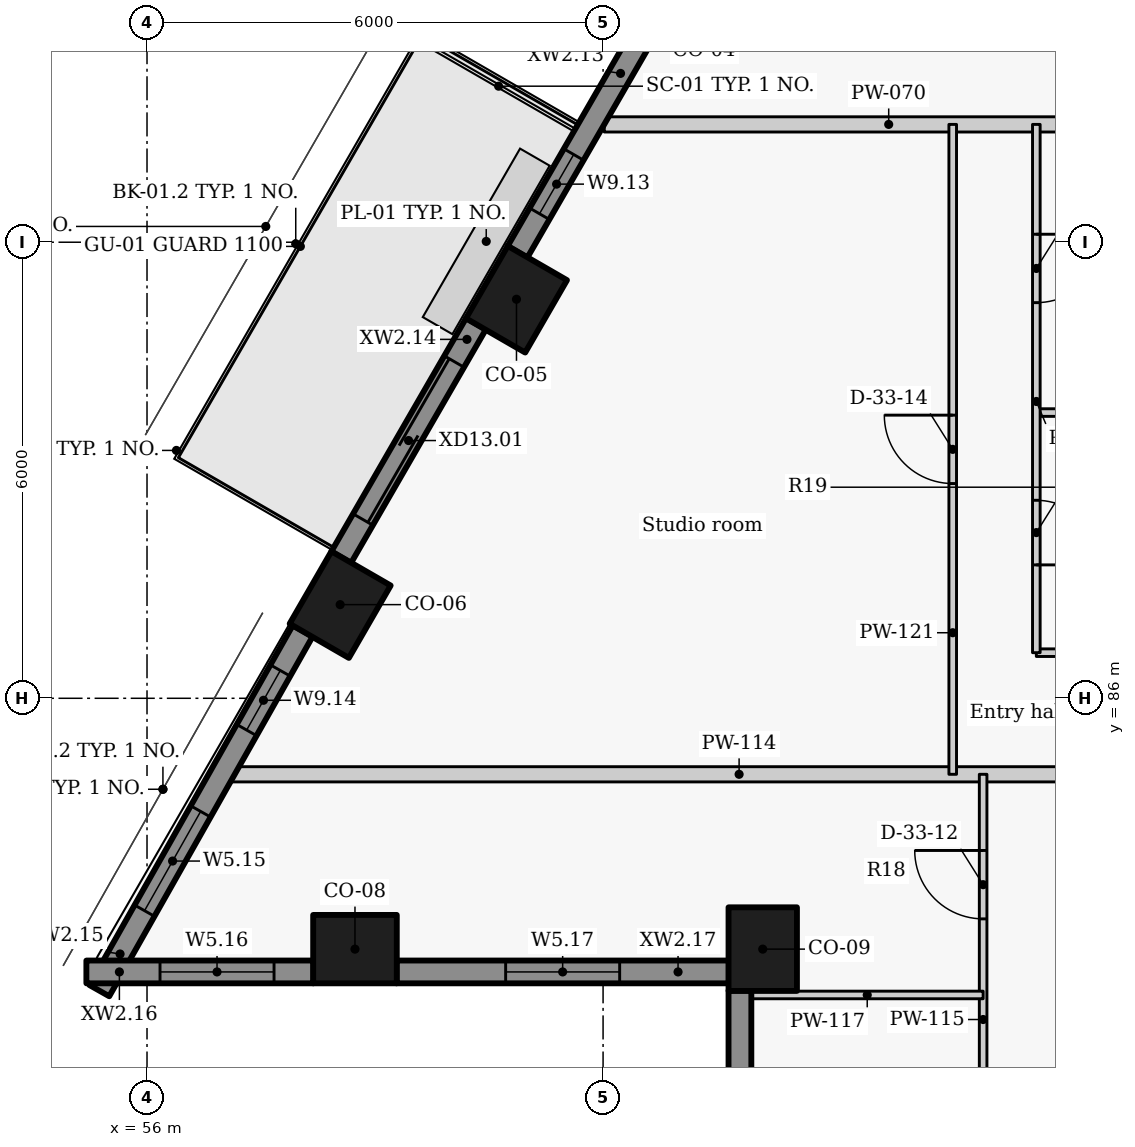
"""IFC4 building model, lengths in metres.
Left out: names, types, materials, properties, quantities, classifications, styles, units other than length and angle.
Written with IfcOpenShell. Run it as: python <this file> out.ifc"""

import sys

from ifc_helpers import new_model, si_unit, direction, frame, frame_2d, origin, origin_2d, place, context, subcontext, project, spatial, rectangle, extrude, element, fill, save


model = new_model("IFC4")
c1 = context("Model", 3, precision=1e-05, world=origin(), true_north=direction((0.0, 1.0)))
c2 = subcontext(c1, "Body", "Model", "MODEL_VIEW")
j1 = project(units=[si_unit("LENGTHUNIT", "METRE"), si_unit("PLANEANGLEUNIT", "RADIAN")], contexts=[c1])
p1 = place(None, origin())
s1 = spatial("IfcSite", under=j1, at=p1, CompositionType="ELEMENT")
p2 = place(p1, origin())
s2 = spatial("IfcBuilding", under=s1, at=p2, CompositionType="ELEMENT")
p3 = place(p2, frame((0.0, 0.0, 269.1)))
s3 = spatial("IfcBuildingStorey", under=s2, at=p3, CompositionType="ELEMENT", Elevation=269.1)
for number, where, z_axis, x_axis in (
    (1, (60.861, 91.25, 0.0), (0.0, 0.0, 1.0), (-0.5, -0.866, 0.0)),
    (2, (58.541, 87.232, 0.0), (0.0, 0.0, 1.0), (-0.5, -0.866, 0.0)),
    (3, (58.736, 82.7, 0.0), (0.0, 0.0, 1.0), (1.0, 0.0, 0.0)),
    (4, (64.101, 82.7, 0.0), (0.0, 0.0, 1.0), (0.0, -1.0, 0.0)),
):
    element("IfcColumn", number, at=place(p3, frame(where, z_axis=z_axis, x_axis=x_axis)), inside=s3, PredefinedType="COLUMN", context=c2, shape_type="SweptSolid", body=[
        extrude(rectangle(XDim=1.1, YDim=0.9, at=origin_2d()), origin(), (0.0, 0.0, 1.0), 3.3),
    ])
p4 = place(p3, frame((62.796, 95.202, 0.0), z_axis=(0.0, 0.0, 1.0), x_axis=(-0.499984490703, -0.866034357896, 0.0)))
e5 = element("IfcWall", 5, at=p4, inside=s3, PredefinedType="SOLIDWALL", context=c2, shape_type="SweptSolid", body=[
    extrude(rectangle(XDim=3.844, YDim=0.3, at=frame_2d((1.922, 0.0))), origin(), (0.0, 0.0, 1.0), 2.125),
])
p5 = place(p4, frame((2.365, 0.0, 0.9)))
e6 = element("IfcOpeningElement", 6, at=p5, cuts=e5, PredefinedType="OPENING", context=c2, shape_type="SweptSolid", body=[
    extrude(rectangle(XDim=0.9, YDim=1.1, at=frame_2d((0.45, 0.55))), frame((0.0, 0.16, 0.0), z_axis=(0.0, -1.0, 0.0), x_axis=(1.0, 0.0, 0.0)), (0.0, 0.0, 1.0), 0.32),
])
p6 = place(p3, frame((60.328, 90.927, 0.0), z_axis=(0.0, 0.0, 1.0), x_axis=(-0.500010404316, -0.866019396766, 0.0)))
e7 = element("IfcWall", 7, at=p6, inside=s3, PredefinedType="SOLIDWALL", context=c2, shape_type="SweptSolid", body=[
    extrude(rectangle(XDim=3.547, YDim=0.3, at=frame_2d((1.774, 0.0))), origin(), (0.0, 0.0, 1.0), 2.125),
])
p7 = place(p6, frame((0.573, 0.0, 0.0)))
e8 = element("IfcOpeningElement", 8, at=p7, cuts=e7, PredefinedType="OPENING", context=c2, shape_type="SweptSolid", body=[
    extrude(rectangle(XDim=2.4, YDim=2.0, at=frame_2d((1.2, 1.0))), frame((0.0, 0.16, 0.0), z_axis=(0.0, -1.0, 0.0), x_axis=(1.0, 0.0, 0.0)), (0.0, 0.0, 1.0), 0.32),
])
p8 = place(p3, frame((58.048, 86.886, 0.0), z_axis=(0.0, 0.0, 1.0), x_axis=(-0.492080931903, -0.870549456641, 0.0)))
e9 = element("IfcWall", 9, at=p8, inside=s3, PredefinedType="SOLIDWALL", context=c2, shape_type="SweptSolid", body=[
    extrude(rectangle(XDim=5.437, YDim=0.3, at=frame_2d((2.718, 0.0))), origin(), (0.0, 0.0, 1.0), 2.125),
])
p9 = place(p8, frame((0.598, 0.0, 0.9)))
e10 = element("IfcOpeningElement", 10, at=p9, cuts=e9, PredefinedType="OPENING", context=c2, shape_type="SweptSolid", body=[
    extrude(rectangle(XDim=0.9, YDim=1.1, at=frame_2d((0.45, 0.55))), frame((0.0, 0.16, 0.0), z_axis=(0.0, -1.0, 0.0), x_axis=(1.0, 0.0, 0.0)), (0.0, 0.0, 1.0), 0.32),
])
p10 = place(p8, frame((2.728, 0.0, 0.9)))
e11 = element("IfcOpeningElement", 11, at=p10, cuts=e9, PredefinedType="OPENING", context=c2, shape_type="SweptSolid", body=[
    extrude(rectangle(XDim=1.5, YDim=1.1, at=frame_2d((0.75, 0.55))), frame((0.0, 0.16, 0.0), z_axis=(0.0, -1.0, 0.0), x_axis=(1.0, 0.0, 0.0)), (0.0, 0.0, 1.0), 0.32),
])
p11 = place(p3, frame((55.202, 82.4, 0.0), z_axis=(0.0, 0.0, 1.0), x_axis=(1.0, 0.0, 0.0)))
e12 = element("IfcWall", 12, at=p11, inside=s3, PredefinedType="SOLIDWALL", context=c2, shape_type="SweptSolid", body=[
    extrude(rectangle(XDim=2.988, YDim=0.3, at=frame_2d((1.494, 0.0))), origin(), (0.0, 0.0, 1.0), 2.125),
])
p12 = place(p11, frame((0.969, 0.0, 0.9)))
e13 = element("IfcOpeningElement", 13, at=p12, cuts=e12, PredefinedType="OPENING", context=c2, shape_type="SweptSolid", body=[
    extrude(rectangle(XDim=1.5, YDim=1.1, at=frame_2d((0.75, 0.55))), frame((0.0, 0.16, 0.0), z_axis=(0.0, -1.0, 0.0), x_axis=(1.0, 0.0, 0.0)), (0.0, 0.0, 1.0), 0.32),
])
p13 = place(p3, frame((59.282, 82.4, 0.0), z_axis=(0.0, 0.0, 1.0), x_axis=(1.0, 0.0, 0.0)))
e14 = element("IfcWall", 14, at=p13, inside=s3, PredefinedType="SOLIDWALL", context=c2, shape_type="SweptSolid", body=[
    extrude(rectangle(XDim=4.373, YDim=0.3, at=frame_2d((2.186, 0.0))), origin(), (0.0, 0.0, 1.0), 2.125),
])
p14 = place(p13, frame((1.436, 0.0, 0.9)))
e15 = element("IfcOpeningElement", 15, at=p14, cuts=e14, PredefinedType="OPENING", context=c2, shape_type="SweptSolid", body=[
    extrude(rectangle(XDim=1.5, YDim=1.1, at=frame_2d((0.75, 0.55))), frame((0.0, 0.16, 0.0), z_axis=(0.0, -1.0, 0.0), x_axis=(1.0, 0.0, 0.0)), (0.0, 0.0, 1.0), 0.32),
])
p15 = place(p3, frame((63.801, 82.154, 0.0), z_axis=(0.0, 0.0, 1.0), x_axis=(0.0, -1.0, 0.0)))
e16 = element("IfcWall", 16, at=p15, inside=s3, PredefinedType="SOLIDWALL", context=c2, shape_type="SweptSolid", body=[
    extrude(rectangle(XDim=4.408, YDim=0.3, at=frame_2d((2.204, 0.0))), origin(), (0.0, 0.0, 1.0), 2.125),
])
p16 = place(p15, frame((1.104, 0.0, 0.9)))
e17 = element("IfcOpeningElement", 17, at=p16, cuts=e16, PredefinedType="OPENING", context=c2, shape_type="SweptSolid", body=[
    extrude(rectangle(XDim=2.1, YDim=1.1, at=frame_2d((1.05, 0.55))), frame((0.0, 0.16, 0.0), z_axis=(0.0, -1.0, 0.0), x_axis=(1.0, 0.0, 0.0)), (0.0, 0.0, 1.0), 0.32),
])
p17 = place(p3, frame((62.015, 93.55, 0.0), z_axis=(0.0, 0.0, 1.0), x_axis=(1.0, 0.0, 0.0)))
e18 = element("IfcWall", 18, at=p17, inside=s3, PredefinedType="PARTITIONING", context=c2, shape_type="SweptSolid", body=[
    extrude(rectangle(XDim=7.485, YDim=0.2, at=frame_2d((3.742, 0.0))), origin(), (0.0, 0.0, 1.0), 2.105),
])
p18 = place(p3, frame((57.079, 85.0, 0.0), z_axis=(0.0, 0.0, 1.0), x_axis=(1.0, 0.0, 0.0)))
e19 = element("IfcWall", 19, at=p18, inside=s3, PredefinedType="PARTITIONING", context=c2, shape_type="SweptSolid", body=[
    extrude(rectangle(XDim=13.421, YDim=0.2, at=frame_2d((6.71, 0.0))), origin(), (0.0, 0.0, 1.0), 2.105),
])
p19 = place(p3, frame((67.0, 75.0, 0.0), z_axis=(0.0, 0.0, 1.0), x_axis=(0.0, 1.0, 0.0)))
e20 = element("IfcWall", 20, at=p19, inside=s3, PredefinedType="PARTITIONING", context=c2, shape_type="SweptSolid", body=[
    extrude(rectangle(XDim=10.0, YDim=0.1, at=frame_2d((5.0, 0.0))), origin(), (0.0, 0.0, 1.0), 3.025),
])
p20 = place(p19, frame((1.002, 0.0, 0.0)))
e21 = element("IfcOpeningElement", 21, at=p20, cuts=e20, PredefinedType="OPENING", context=c2, shape_type="SweptSolid", body=[
    extrude(rectangle(XDim=0.9, YDim=2.1, at=frame_2d((0.45, 1.05))), frame((0.0, 0.06, 0.0), z_axis=(0.0, -1.0, 0.0), x_axis=(1.0, 0.0, 0.0)), (0.0, 0.0, 1.0), 0.12),
])
p21 = place(p19, frame((4.55, 0.0, 0.0)))
e22 = element("IfcOpeningElement", 22, at=p21, cuts=e20, PredefinedType="OPENING", context=c2, shape_type="SweptSolid", body=[
    extrude(rectangle(XDim=0.9, YDim=2.1, at=frame_2d((0.45, 1.05))), frame((0.0, 0.06, 0.0), z_axis=(0.0, -1.0, 0.0), x_axis=(1.0, 0.0, 0.0)), (0.0, 0.0, 1.0), 0.12),
])
p22 = place(p19, frame((8.098, 0.0, 0.0)))
e23 = element("IfcOpeningElement", 23, at=p22, cuts=e20, PredefinedType="OPENING", context=c2, shape_type="SweptSolid", body=[
    extrude(rectangle(XDim=0.9, YDim=2.1, at=frame_2d((0.45, 1.05))), frame((0.0, 0.06, 0.0), z_axis=(0.0, -1.0, 0.0), x_axis=(1.0, 0.0, 0.0)), (0.0, 0.0, 1.0), 0.12),
])
p23 = place(p3, frame((63.95, 82.097, 0.0), z_axis=(0.0, 0.0, 1.0), x_axis=(1.0, 0.0, 0.0)))
e24 = element("IfcWall", 24, at=p23, inside=s3, PredefinedType="PARTITIONING", context=c2, shape_type="SweptSolid", body=[
    extrude(rectangle(XDim=3.05, YDim=0.1, at=frame_2d((1.525, 0.0))), origin(), (0.0, 0.0, 1.0), 2.105),
])
for number, where, z_axis, x_axis in (
    (25, (67.7, 89.759, 0.0), (0.0, 0.0, 1.0), (1.0, 0.0, 0.0)),
    (26, (67.7, 86.6, 0.0), (0.0, 0.0, 1.0), (1.0, 0.0, 0.0)),
):
    element("IfcWall", number, at=place(p3, frame(where, z_axis=z_axis, x_axis=x_axis)), inside=s3, PredefinedType="PARTITIONING", context=c2, shape_type="SweptSolid", body=[
        extrude(rectangle(XDim=2.8, YDim=0.1, at=frame_2d((1.4, 0.0))), origin(), (0.0, 0.0, 1.0), 2.505),
    ])
p24 = place(p3, frame((67.7, 93.55, 0.0), z_axis=(0.0, 0.0, 1.0), x_axis=(0.0, -1.0, 0.0)))
e27 = element("IfcWall", 27, at=p24, inside=s3, PredefinedType="PARTITIONING", context=c2, shape_type="SweptSolid", body=[
    extrude(rectangle(XDim=6.95, YDim=0.1, at=frame_2d((3.475, 0.0))), origin(), (0.0, 0.0, 1.0), 3.025),
])
p25 = place(p24, frame((4.945, 0.0, 0.0)))
e28 = element("IfcOpeningElement", 28, at=p25, cuts=e27, PredefinedType="OPENING", context=c2, shape_type="SweptSolid", body=[
    extrude(rectangle(XDim=0.85, YDim=2.1, at=frame_2d((0.425, 1.05))), frame((0.0, 0.06, 0.0), z_axis=(0.0, -1.0, 0.0), x_axis=(1.0, 0.0, 0.0)), (0.0, 0.0, 1.0), 0.12),
])
p26 = place(p24, frame((1.445, 0.0, 0.0)))
e29 = element("IfcOpeningElement", 29, at=p26, cuts=e27, PredefinedType="OPENING", context=c2, shape_type="SweptSolid", body=[
    extrude(rectangle(XDim=0.9, YDim=2.1, at=frame_2d((0.45, 1.05))), frame((0.0, 0.06, 0.0), z_axis=(0.0, -1.0, 0.0), x_axis=(1.0, 0.0, 0.0)), (0.0, 0.0, 1.0), 0.12),
])
p27 = place(p3, frame((66.6, 85.0, 0.0), z_axis=(0.0, 0.0, 1.0), x_axis=(0.0, 1.0, 0.0)))
e30 = element("IfcWall", 30, at=p27, inside=s3, PredefinedType="PARTITIONING", context=c2, shape_type="SweptSolid", body=[
    extrude(rectangle(XDim=8.55, YDim=0.1, at=frame_2d((4.275, 0.0))), origin(), (0.0, 0.0, 1.0), 3.025),
])
p28 = place(p27, frame((3.825, 0.0, 0.0)))
e31 = element("IfcOpeningElement", 31, at=p28, cuts=e30, PredefinedType="OPENING", context=c2, shape_type="SweptSolid", body=[
    extrude(rectangle(XDim=0.9, YDim=2.1, at=frame_2d((0.45, 1.05))), frame((0.0, 0.06, 0.0), z_axis=(0.0, -1.0, 0.0), x_axis=(1.0, 0.0, 0.0)), (0.0, 0.0, 1.0), 0.12),
])
p29 = place(p5, origin())
e32 = element("IfcWindow", 32, at=p29, inside=s3, PartitioningType="SINGLE_PANEL", PredefinedType="WINDOW", context=c2, shape_type="SweptSolid", body=[
    extrude(rectangle(XDim=0.9, YDim=1.1, at=frame_2d((0.45, 0.55))), frame((0.0, 0.03, 0.0), z_axis=(0.0, -1.0, 0.0), x_axis=(1.0, 0.0, 0.0)), (0.0, 0.0, 1.0), 0.06),
])
fill(e6, e32)
p30 = place(p7, origin())
e33 = element("IfcDoor", 33, at=p30, inside=s3, OperationType="DOUBLE_DOOR_SLIDING", PredefinedType="DOOR", context=c2, shape_type="SweptSolid", body=[
    extrude(rectangle(XDim=2.4, YDim=2.0, at=frame_2d((1.2, 1.0))), frame((0.0, 0.025, 0.0), z_axis=(0.0, -1.0, 0.0), x_axis=(1.0, 0.0, 0.0)), (0.0, 0.0, 1.0), 0.05),
])
fill(e8, e33)
p31 = place(p9, origin())
e34 = element("IfcWindow", 34, at=p31, inside=s3, PartitioningType="SINGLE_PANEL", PredefinedType="WINDOW", context=c2, shape_type="SweptSolid", body=[
    extrude(rectangle(XDim=0.9, YDim=1.1, at=frame_2d((0.45, 0.55))), frame((0.0, 0.03, 0.0), z_axis=(0.0, -1.0, 0.0), x_axis=(1.0, 0.0, 0.0)), (0.0, 0.0, 1.0), 0.06),
])
fill(e10, e34)
p32 = place(p10, origin())
e35 = element("IfcWindow", 35, at=p32, inside=s3, PartitioningType="SINGLE_PANEL", PredefinedType="WINDOW", context=c2, shape_type="SweptSolid", body=[
    extrude(rectangle(XDim=1.5, YDim=1.1, at=frame_2d((0.75, 0.55))), frame((0.0, 0.03, 0.0), z_axis=(0.0, -1.0, 0.0), x_axis=(1.0, 0.0, 0.0)), (0.0, 0.0, 1.0), 0.06),
])
fill(e11, e35)
p33 = place(p12, origin())
e36 = element("IfcWindow", 36, at=p33, inside=s3, PartitioningType="SINGLE_PANEL", PredefinedType="WINDOW", context=c2, shape_type="SweptSolid", body=[
    extrude(rectangle(XDim=1.5, YDim=1.1, at=frame_2d((0.75, 0.55))), frame((0.0, 0.03, 0.0), z_axis=(0.0, -1.0, 0.0), x_axis=(1.0, 0.0, 0.0)), (0.0, 0.0, 1.0), 0.06),
])
fill(e13, e36)
p34 = place(p14, origin())
e37 = element("IfcWindow", 37, at=p34, inside=s3, PartitioningType="SINGLE_PANEL", PredefinedType="WINDOW", context=c2, shape_type="SweptSolid", body=[
    extrude(rectangle(XDim=1.5, YDim=1.1, at=frame_2d((0.75, 0.55))), frame((0.0, 0.03, 0.0), z_axis=(0.0, -1.0, 0.0), x_axis=(1.0, 0.0, 0.0)), (0.0, 0.0, 1.0), 0.06),
])
fill(e15, e37)
p35 = place(p22, origin())
e38 = element("IfcDoor", 38, at=p35, inside=s3, OperationType="SINGLE_SWING_RIGHT", PredefinedType="DOOR", context=c2, shape_type="SweptSolid", body=[
    extrude(rectangle(XDim=0.9, YDim=2.1, at=frame_2d((0.45, 1.05))), frame((0.0, 0.025, 0.0), z_axis=(0.0, -1.0, 0.0), x_axis=(1.0, 0.0, 0.0)), (0.0, 0.0, 1.0), 0.05),
])
fill(e23, e38)
p36 = place(p25, origin())
e39 = element("IfcDoor", 39, at=p36, inside=s3, OperationType="SINGLE_SWING_RIGHT", PredefinedType="DOOR", context=c2, shape_type="SweptSolid", body=[
    extrude(rectangle(XDim=0.85, YDim=2.1, at=frame_2d((0.425, 1.05))), frame((0.0, 0.025, 0.0), z_axis=(0.0, -1.0, 0.0), x_axis=(1.0, 0.0, 0.0)), (0.0, 0.0, 1.0), 0.05),
])
fill(e28, e39)
p37 = place(p26, origin())
e40 = element("IfcDoor", 40, at=p37, inside=s3, OperationType="SINGLE_SWING_LEFT", PredefinedType="DOOR", context=c2, shape_type="SweptSolid", body=[
    extrude(rectangle(XDim=0.9, YDim=2.1, at=frame_2d((0.45, 1.05))), frame((0.0, 0.025, 0.0), z_axis=(0.0, -1.0, 0.0), x_axis=(1.0, 0.0, 0.0)), (0.0, 0.0, 1.0), 0.05),
])
fill(e29, e40)
p38 = place(p28, origin())
e41 = element("IfcDoor", 41, at=p38, inside=s3, OperationType="SINGLE_SWING_RIGHT", PredefinedType="DOOR", context=c2, shape_type="SweptSolid", body=[
    extrude(rectangle(XDim=0.9, YDim=2.1, at=frame_2d((0.45, 1.05))), frame((0.0, 0.025, 0.0), z_axis=(0.0, -1.0, 0.0), x_axis=(1.0, 0.0, 0.0)), (0.0, 0.0, 1.0), 0.05),
])
fill(e31, e41)
save(model, sys.argv[1])
